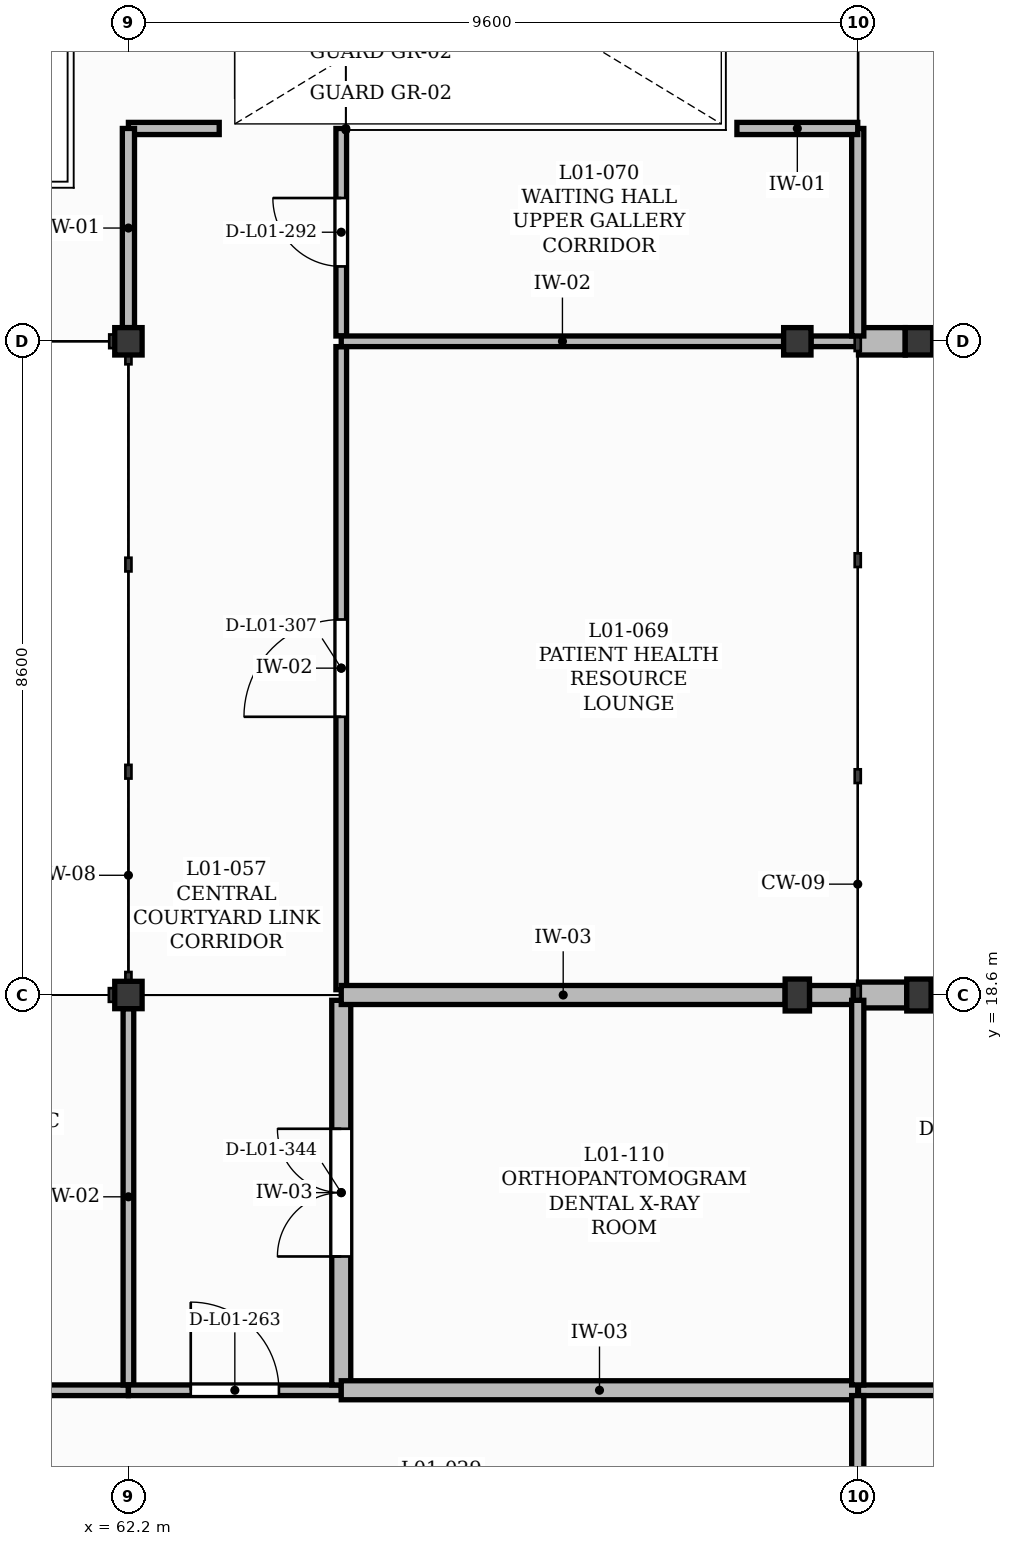
"""IFC4 building model, lengths in metres.
Left out: names, types, materials, properties, quantities, classifications, styles, units other than length and angle.
Written with IfcOpenShell. Run it as: python <this file> out.ifc"""

import sys

from ifc_helpers import new_model, si_unit, direction, frame, frame_2d, origin, origin_2d, place, context, subcontext, project, spatial, rectangle, extrude, element, fill, save


model = new_model("IFC4")
c1 = context("Model", 3, precision=1e-05, world=origin(), true_north=direction((0.0, 1.0)))
c2 = subcontext(c1, "Body", "Model", "MODEL_VIEW")
j1 = project(units=[si_unit("LENGTHUNIT", "METRE"), si_unit("PLANEANGLEUNIT", "RADIAN")], contexts=[c1])
p1 = place(None, origin())
s1 = spatial("IfcSite", under=j1, at=p1, CompositionType="ELEMENT")
p2 = place(p1, origin())
s2 = spatial("IfcBuilding", under=s1, at=p2, CompositionType="ELEMENT")
p3 = place(p2, frame((0.0, 0.0, 4.5)))
s3 = spatial("IfcBuildingStorey", under=s2, at=p3, CompositionType="ELEMENT", Elevation=4.5)
p4 = place(p3, frame((72.6, 18.6, 0.0), z_axis=(0.0, 0.0, 1.0), x_axis=(1.0, 0.0, 0.0)))
e1 = element("IfcColumn", 1, at=p4, inside=s3, PredefinedType="COLUMN", context=c2, shape_type="SweptSolid", body=[
    extrude(rectangle(XDim=0.32, YDim=0.42, at=origin_2d()), origin(), (0.0, 0.0, 1.0), 4.26),
])
p5 = place(p3, frame((72.6, 27.2, 0.0), z_axis=(0.0, 0.0, 1.0), x_axis=(1.0, 0.0, 0.0)))
e2 = element("IfcColumn", 2, at=p5, inside=s3, PredefinedType="COLUMN", context=c2, shape_type="SweptSolid", body=[
    extrude(rectangle(XDim=0.36, YDim=0.36, at=origin_2d()), origin(), (0.0, 0.0, 1.0), 4.3),
])
p6 = place(p3, frame((62.2, 18.6, 0.0), z_axis=(0.0, 0.0, 1.0), x_axis=(1.0, 0.0, 0.0)))
e3 = element("IfcColumn", 3, at=p6, inside=s3, PredefinedType="COLUMN", context=c2, shape_type="SweptSolid", body=[
    extrude(rectangle(XDim=0.36, YDim=0.36, at=origin_2d()), origin(), (0.0, 0.0, 1.0), 4.26),
])
p7 = place(p3, frame((62.2, 27.2, 0.0), z_axis=(0.0, 0.0, 1.0), x_axis=(1.0, 0.0, 0.0)))
e4 = element("IfcColumn", 4, at=p7, inside=s3, PredefinedType="COLUMN", context=c2, shape_type="SweptSolid", body=[
    extrude(rectangle(XDim=0.36, YDim=0.36, at=origin_2d()), origin(), (0.0, 0.0, 1.0), 4.3),
])
p8 = place(p3, frame((71.0, 18.6, 0.0), z_axis=(0.0, 0.0, 1.0), x_axis=(1.0, 0.0, 0.0)))
e5 = element("IfcColumn", 5, at=p8, inside=s3, PredefinedType="COLUMN", context=c2, shape_type="SweptSolid", body=[
    extrude(rectangle(XDim=0.32, YDim=0.42, at=origin_2d()), origin(), (0.0, 0.0, 1.0), 4.26),
])
p9 = place(p3, frame((71.0, 27.2, 0.0), z_axis=(0.0, 0.0, 1.0), x_axis=(1.0, 0.0, 0.0)))
e6 = element("IfcColumn", 6, at=p9, inside=s3, PredefinedType="COLUMN", context=c2, shape_type="SweptSolid", body=[
    extrude(rectangle(XDim=0.36, YDim=0.36, at=origin_2d()), origin(), (0.0, 0.0, 1.0), 4.3),
])
p10 = place(p3, frame((71.805, 18.6, 0.0), z_axis=(0.0, 0.0, 1.0), x_axis=(1.0, 0.0, 0.0)))
e7 = element("IfcWall", 7, at=p10, inside=s3, PredefinedType="SOLIDWALL", context=c2, shape_type="SweptSolid", body=[
    extrude(rectangle(XDim=0.635, YDim=0.34, at=frame_2d((0.317, 0.0))), origin(), (0.0, 0.0, 1.0), 4.26),
])
p11 = place(p3, frame((71.805, 27.2, 0.0), z_axis=(0.0, 0.0, 1.0), x_axis=(1.0, 0.0, 0.0)))
e8 = element("IfcWall", 8, at=p11, inside=s3, PredefinedType="SOLIDWALL", context=c2, shape_type="SweptSolid", body=[
    extrude(rectangle(XDim=0.615, YDim=0.36, at=frame_2d((0.308, 0.0))), origin(), (0.0, 0.0, 1.0), 4.3),
])
p12 = place(p3, frame((58.233, 13.4, 0.0), z_axis=(0.0, 0.0, 1.0), x_axis=(1.0, 0.0, 0.0)))
e9 = element("IfcWall", 9, at=p12, inside=s3, PredefinedType="PARTITIONING", context=c2, shape_type="SweptSolid", body=[
    extrude(rectangle(XDim=3.967, YDim=0.14, at=frame_2d((1.983, 0.0))), origin(), (0.0, 0.0, 1.0), 4.18),
])
p13 = place(p12, frame((1.404, 0.0, 0.0)))
e10 = element("IfcOpeningElement", 10, at=p13, cuts=e9, PredefinedType="OPENING", context=c2, shape_type="SweptSolid", body=[
    extrude(rectangle(XDim=1.16, YDim=2.1, at=frame_2d((0.58, 1.05))), frame((0.0, 0.08, 0.0), z_axis=(0.0, -1.0, 0.0), x_axis=(1.0, 0.0, 0.0)), (0.0, 0.0, 1.0), 0.16),
])
p14 = place(p3, frame((62.2, 13.47, 0.0), z_axis=(0.0, 0.0, 1.0), x_axis=(0.0, 1.0, 0.0)))
e11 = element("IfcWall", 11, at=p14, inside=s3, PredefinedType="PARTITIONING", context=c2, shape_type="SweptSolid", body=[
    extrude(rectangle(XDim=4.95, YDim=0.14, at=frame_2d((2.475, 0.0))), origin(), (0.0, 0.0, 1.0), 3.74),
])
p15 = place(p3, frame((62.2, 13.4, 0.0), z_axis=(0.0, 0.0, 1.0), x_axis=(1.0, 0.0, 0.0)))
e12 = element("IfcWall", 12, at=p15, inside=s3, PredefinedType="PARTITIONING", context=c2, shape_type="SweptSolid", body=[
    extrude(rectangle(XDim=2.8, YDim=0.14, at=frame_2d((1.4, 0.0))), origin(), (0.0, 0.0, 1.0), 4.18),
])
p16 = place(p15, frame((0.82, 0.0, 0.0)))
e13 = element("IfcOpeningElement", 13, at=p16, cuts=e12, PredefinedType="OPENING", context=c2, shape_type="SweptSolid", body=[
    extrude(rectangle(XDim=1.16, YDim=2.1, at=frame_2d((0.58, 1.05))), frame((0.0, 0.08, 0.0), z_axis=(0.0, -1.0, 0.0), x_axis=(1.0, 0.0, 0.0)), (0.0, 0.0, 1.0), 0.16),
])
p17 = place(p3, frame((65.0, 13.47, 0.0), z_axis=(0.0, 0.0, 1.0), x_axis=(0.0, 1.0, 0.0)))
e14 = element("IfcWall", 14, at=p17, inside=s3, PredefinedType="SOLIDWALL", context=c2, shape_type="SweptSolid", body=[
    extrude(rectangle(XDim=5.06, YDim=0.25, at=frame_2d((2.53, 0.0))), origin(), (0.0, 0.0, 1.0), 4.18),
])
p18 = place(p17, frame((1.69, 0.0, 0.0)))
e15 = element("IfcOpeningElement", 15, at=p18, cuts=e14, PredefinedType="OPENING", context=c2, shape_type="SweptSolid", body=[
    extrude(rectangle(XDim=1.68, YDim=2.3, at=frame_2d((0.84, 1.15))), frame((0.0, 0.135, 0.0), z_axis=(0.0, -1.0, 0.0), x_axis=(1.0, 0.0, 0.0)), (0.0, 0.0, 1.0), 0.27),
])
p19 = place(p3, frame((65.0, 13.4, 0.0), z_axis=(0.0, 0.0, 1.0), x_axis=(1.0, 0.0, 0.0)))
e16 = element("IfcWall", 16, at=p19, inside=s3, PredefinedType="SOLIDWALL", context=c2, shape_type="SweptSolid", body=[
    extrude(rectangle(XDim=6.795, YDim=0.25, at=frame_2d((3.397, 0.0))), origin(), (0.0, 0.0, 1.0), 4.18),
])
p20 = place(p3, frame((65.0, 18.67, 0.0), z_axis=(0.0, 0.0, 1.0), x_axis=(0.0, 1.0, 0.0)))
e17 = element("IfcWall", 17, at=p20, inside=s3, PredefinedType="PARTITIONING", context=c2, shape_type="SweptSolid", body=[
    extrude(rectangle(XDim=8.46, YDim=0.14, at=frame_2d((4.23, 0.0))), origin(), (0.0, 0.0, 1.0), 4.18),
])
p21 = place(p20, frame((3.59, 0.0, 0.0)))
e18 = element("IfcOpeningElement", 18, at=p21, cuts=e17, PredefinedType="OPENING", context=c2, shape_type="SweptSolid", body=[
    extrude(rectangle(XDim=1.28, YDim=2.2, at=frame_2d((0.64, 1.1))), frame((0.0, 0.08, 0.0), z_axis=(0.0, -1.0, 0.0), x_axis=(1.0, 0.0, 0.0)), (0.0, 0.0, 1.0), 0.16),
])
p22 = place(p3, frame((65.0, 18.6, 0.0), z_axis=(0.0, 0.0, 1.0), x_axis=(1.0, 0.0, 0.0)))
e19 = element("IfcWall", 19, at=p22, inside=s3, PredefinedType="SOLIDWALL", context=c2, shape_type="SweptSolid", body=[
    extrude(rectangle(XDim=5.84, YDim=0.25, at=frame_2d((2.92, 0.0))), origin(), (0.0, 0.0, 1.0), 3.8),
])
p23 = place(p3, frame((71.16, 18.6, 0.0), z_axis=(0.0, 0.0, 1.0), x_axis=(1.0, 0.0, 0.0)))
e20 = element("IfcWall", 20, at=p23, inside=s3, PredefinedType="SOLIDWALL", context=c2, shape_type="SweptSolid", body=[
    extrude(rectangle(XDim=0.575, YDim=0.25, at=frame_2d((0.288, 0.0))), origin(), (0.0, 0.0, 1.0), 4.18),
])
p24 = place(p3, frame((65.0, 27.27, 0.0), z_axis=(0.0, 0.0, 1.0), x_axis=(0.0, 1.0, 0.0)))
e21 = element("IfcWall", 21, at=p24, inside=s3, PredefinedType="PARTITIONING", context=c2, shape_type="SweptSolid", body=[
    extrude(rectangle(XDim=2.73, YDim=0.14, at=frame_2d((1.365, 0.0))), origin(), (0.0, 0.0, 1.0), 4.18),
])
p25 = place(p24, frame((0.915, 0.0, 0.0)))
e22 = element("IfcOpeningElement", 22, at=p25, cuts=e21, PredefinedType="OPENING", context=c2, shape_type="SweptSolid", body=[
    extrude(rectangle(XDim=0.9, YDim=2.1, at=frame_2d((0.45, 1.05))), frame((0.0, 0.08, 0.0), z_axis=(0.0, -1.0, 0.0), x_axis=(1.0, 0.0, 0.0)), (0.0, 0.0, 1.0), 0.16),
])
p26 = place(p3, frame((65.0, 27.2, 0.0), z_axis=(0.0, 0.0, 1.0), x_axis=(1.0, 0.0, 0.0)))
e23 = element("IfcWall", 23, at=p26, inside=s3, PredefinedType="PARTITIONING", context=c2, shape_type="SweptSolid", body=[
    extrude(rectangle(XDim=5.82, YDim=0.14, at=frame_2d((2.91, 0.0))), origin(), (0.0, 0.0, 1.0), 3.85),
])
p27 = place(p3, frame((71.18, 27.2, 0.0), z_axis=(0.0, 0.0, 1.0), x_axis=(1.0, 0.0, 0.0)))
e24 = element("IfcWall", 24, at=p27, inside=s3, PredefinedType="PARTITIONING", context=c2, shape_type="SweptSolid", body=[
    extrude(rectangle(XDim=0.615, YDim=0.14, at=frame_2d((0.308, 0.0))), origin(), (0.0, 0.0, 1.0), 4.18),
])
p28 = place(p3, frame((71.805, 13.4, 0.0), z_axis=(0.0, 0.0, 1.0), x_axis=(1.0, 0.0, 0.0)))
e25 = element("IfcWall", 25, at=p28, inside=s3, PredefinedType="PARTITIONING", context=c2, shape_type="SweptSolid", body=[
    extrude(rectangle(XDim=3.819, YDim=0.14, at=frame_2d((1.91, 0.0))), origin(), (0.0, 0.0, 1.0), 4.18),
])
p29 = place(p28, frame((1.449, 0.0, 0.0)))
e26 = element("IfcOpeningElement", 26, at=p29, cuts=e25, PredefinedType="OPENING", context=c2, shape_type="SweptSolid", body=[
    extrude(rectangle(XDim=0.92, YDim=2.1, at=frame_2d((0.46, 1.05))), frame((0.0, 0.08, 0.0), z_axis=(0.0, -1.0, 0.0), x_axis=(1.0, 0.0, 0.0)), (0.0, 0.0, 1.0), 0.16),
])
p30 = place(p3, frame((71.795, 10.87, 0.0), z_axis=(0.0, 0.0, 1.0), x_axis=(0.0, 1.0, 0.0)))
e27 = element("IfcWall", 27, at=p30, inside=s3, PredefinedType="PARTITIONING", context=c2, shape_type="SweptSolid", body=[
    extrude(rectangle(XDim=2.46, YDim=0.16, at=frame_2d((1.23, 0.0))), origin(), (0.0, 0.0, 1.0), 4.18),
])
p31 = place(p3, frame((63.395, 30.0, 0.0), z_axis=(0.0, 0.0, 1.0), x_axis=(-1.0, 0.0, 0.0)))
e28 = element("IfcWall", 28, at=p31, inside=s3, PredefinedType="PARTITIONING", context=c2, shape_type="SweptSolid", body=[
    extrude(rectangle(XDim=1.195, YDim=0.16, at=frame_2d((0.597, 0.0))), origin(), (0.0, 0.0, 1.0), 4.18),
])
p32 = place(p3, frame((62.2, 27.38, 0.0), z_axis=(0.0, 0.0, 1.0), x_axis=(0.0, 1.0, 0.0)))
e29 = element("IfcWall", 29, at=p32, inside=s3, PredefinedType="PARTITIONING", context=c2, shape_type="SweptSolid", body=[
    extrude(rectangle(XDim=2.62, YDim=0.16, at=frame_2d((1.31, 0.0))), origin(), (0.0, 0.0, 1.0), 4.18),
])
p33 = place(p3, frame((71.795, 27.27, 0.0), z_axis=(0.0, 0.0, 1.0), x_axis=(0.0, 1.0, 0.0)))
e30 = element("IfcWall", 30, at=p33, inside=s3, PredefinedType="PARTITIONING", context=c2, shape_type="SweptSolid", body=[
    extrude(rectangle(XDim=2.73, YDim=0.16, at=frame_2d((1.365, 0.0))), origin(), (0.0, 0.0, 1.0), 4.18),
])
p34 = place(p3, frame((71.795, 30.0, 0.0), z_axis=(0.0, 0.0, 1.0), x_axis=(-1.0, 0.0, 0.0)))
e31 = element("IfcWall", 31, at=p34, inside=s3, PredefinedType="PARTITIONING", context=c2, shape_type="SweptSolid", body=[
    extrude(rectangle(XDim=1.589, YDim=0.16, at=frame_2d((0.795, 0.0))), origin(), (0.0, 0.0, 1.0), 4.18),
])
p35 = place(p3, frame((71.795, 13.47, 0.0), z_axis=(0.0, 0.0, 1.0), x_axis=(0.0, 1.0, 0.0)))
e32 = element("IfcWall", 32, at=p35, inside=s3, PredefinedType="PARTITIONING", context=c2, shape_type="SweptSolid", body=[
    extrude(rectangle(XDim=5.06, YDim=0.16, at=frame_2d((2.53, 0.0))), origin(), (0.0, 0.0, 1.0), 4.18),
])
p36 = place(p16, origin())
e33 = element("IfcDoor", 33, at=p36, inside=s3, OperationType="SINGLE_SWING_LEFT", PredefinedType="DOOR", context=c2, shape_type="SweptSolid", body=[
    extrude(rectangle(XDim=1.16, YDim=2.1, at=frame_2d((0.58, 1.05))), frame((0.0, 0.025, 0.0), z_axis=(0.0, -1.0, 0.0), x_axis=(1.0, 0.0, 0.0)), (0.0, 0.0, 1.0), 0.05),
])
fill(e13, e33)
p37 = place(p25, origin())
e34 = element("IfcDoor", 34, at=p37, inside=s3, OperationType="SINGLE_SWING_RIGHT", PredefinedType="DOOR", context=c2, shape_type="SweptSolid", body=[
    extrude(rectangle(XDim=0.9, YDim=2.1, at=frame_2d((0.45, 1.05))), frame((0.0, 0.025, 0.0), z_axis=(0.0, -1.0, 0.0), x_axis=(1.0, 0.0, 0.0)), (0.0, 0.0, 1.0), 0.05),
])
fill(e22, e34)
p38 = place(p21, origin())
e35 = element("IfcDoor", 35, at=p38, inside=s3, OperationType="SINGLE_SWING_LEFT", PredefinedType="DOOR", context=c2, shape_type="SweptSolid", body=[
    extrude(rectangle(XDim=1.28, YDim=2.2, at=frame_2d((0.64, 1.1))), frame((0.0, 0.025, 0.0), z_axis=(0.0, -1.0, 0.0), x_axis=(1.0, 0.0, 0.0)), (0.0, 0.0, 1.0), 0.05),
])
fill(e18, e35)
p39 = place(p18, origin())
e36 = element("IfcDoor", 36, at=p39, inside=s3, OperationType="DOUBLE_DOOR_SINGLE_SWING", PredefinedType="DOOR", context=c2, shape_type="SweptSolid", body=[
    extrude(rectangle(XDim=1.68, YDim=2.3, at=frame_2d((0.84, 1.15))), frame((0.0, 0.025, 0.0), z_axis=(0.0, -1.0, 0.0), x_axis=(1.0, 0.0, 0.0)), (0.0, 0.0, 1.0), 0.05),
])
fill(e15, e36)
save(model, sys.argv[1])
